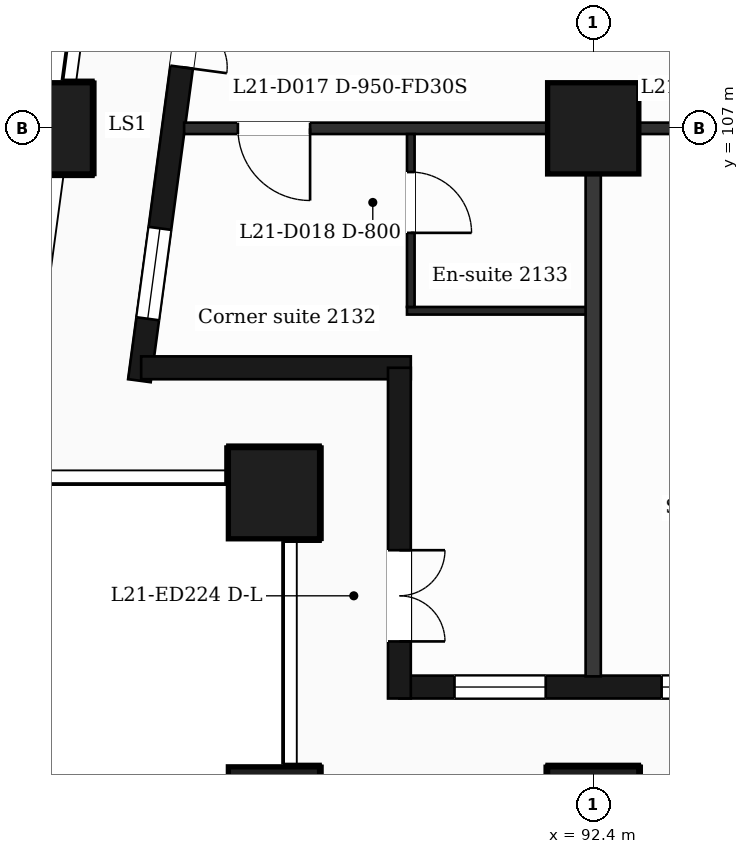
"""IFC4 building model, lengths in metres.
Left out: names, types, materials, properties, quantities, classifications, styles, units other than length and angle.
Written with IfcOpenShell. Run it as: python <this file> out.ifc"""

import sys

from ifc_helpers import new_model, si_unit, direction, frame, frame_2d, origin, origin_2d, place, context, subcontext, project, spatial, rectangle, extrude, element, fill, save


model = new_model("IFC4")
c1 = context("Model", 3, precision=1e-05, world=origin(), true_north=direction((0.0, 1.0)))
c2 = subcontext(c1, "Body", "Model", "MODEL_VIEW")
j1 = project(units=[si_unit("LENGTHUNIT", "METRE"), si_unit("PLANEANGLEUNIT", "RADIAN")], contexts=[c1])
p1 = place(None, origin())
s1 = spatial("IfcSite", under=j1, at=p1, CompositionType="ELEMENT")
p2 = place(p1, origin())
s2 = spatial("IfcBuilding", under=s1, at=p2, CompositionType="ELEMENT")
p3 = place(p2, frame((0.0, 0.0, 94.7)))
s3 = spatial("IfcBuildingStorey", under=s2, at=p3, CompositionType="ELEMENT", Elevation=94.7)
for number, where, z_axis, x_axis in (
    (1, (92.4, 98.0, 0.0), (0.0, 0.0, 1.0), (1.0, 0.0, 0.0)),
    (2, (88.2, 98.0, 0.0), (0.0, 0.0, 1.0), (1.0, 0.0, 0.0)),
    (3, (88.2, 102.2, 0.0), (0.0, 0.0, 1.0), (1.0, 0.0, 0.0)),
    (4, (92.4, 107.0, 0.0), (0.0, 0.0, 1.0), (1.0, 0.0, 0.0)),
    (5, (85.211, 107.0, 0.0), (0.0, 0.0, 1.0), (1.0, 0.0, 0.0)),
):
    element("IfcColumn", number, at=place(p3, frame(where, z_axis=z_axis, x_axis=x_axis)), inside=s3, PredefinedType="COLUMN", context=c2, shape_type="SweptSolid", body=[
        extrude(rectangle(XDim=1.2, YDim=1.2, at=origin_2d()), origin(), (0.0, 0.0, 1.0), 3.7),
    ])
p4 = place(p3, frame((89.85, 99.65, 0.0), z_axis=(0.0, 0.0, 1.0), x_axis=(1.0, 0.0, 0.0)))
e6 = element("IfcWall", 6, at=p4, inside=s3, PredefinedType="SOLIDWALL", context=c2, shape_type="SweptSolid", body=[
    extrude(rectangle(XDim=47.25, YDim=0.3, at=frame_2d((23.625, 0.0))), origin(), (0.0, 0.0, 1.0), 3.38),
])
p5 = place(p4, frame((0.725, 0.0, 0.9)))
e7 = element("IfcOpeningElement", 7, at=p5, cuts=e6, PredefinedType="OPENING", context=c2, shape_type="SweptSolid", body=[
    extrude(rectangle(XDim=1.2, YDim=2.1, at=frame_2d((0.6, 1.05))), frame((0.0, 0.16, 0.0), z_axis=(0.0, -1.0, 0.0), x_axis=(1.0, 0.0, 0.0)), (0.0, 0.0, 1.0), 0.32),
])
p6 = place(p4, frame((3.45, 0.0, 0.9)))
e8 = element("IfcOpeningElement", 8, at=p6, cuts=e6, PredefinedType="OPENING", context=c2, shape_type="SweptSolid", body=[
    extrude(rectangle(XDim=2.4, YDim=2.1, at=frame_2d((1.2, 1.05))), frame((0.0, 0.16, 0.0), z_axis=(0.0, -1.0, 0.0), x_axis=(1.0, 0.0, 0.0)), (0.0, 0.0, 1.0), 0.32),
])
p7 = place(p4, frame((7.65, 0.0, 0.9)))
e9 = element("IfcOpeningElement", 9, at=p7, cuts=e6, PredefinedType="OPENING", context=c2, shape_type="SweptSolid", body=[
    extrude(rectangle(XDim=2.4, YDim=2.1, at=frame_2d((1.2, 1.05))), frame((0.0, 0.16, 0.0), z_axis=(0.0, -1.0, 0.0), x_axis=(1.0, 0.0, 0.0)), (0.0, 0.0, 1.0), 0.32),
])
p8 = place(p4, frame((11.85, 0.0, 0.9)))
e10 = element("IfcOpeningElement", 10, at=p8, cuts=e6, PredefinedType="OPENING", context=c2, shape_type="SweptSolid", body=[
    extrude(rectangle(XDim=2.4, YDim=2.1, at=frame_2d((1.2, 1.05))), frame((0.0, 0.16, 0.0), z_axis=(0.0, -1.0, 0.0), x_axis=(1.0, 0.0, 0.0)), (0.0, 0.0, 1.0), 0.32),
])
p9 = place(p4, frame((16.05, 0.0, 0.9)))
e11 = element("IfcOpeningElement", 11, at=p9, cuts=e6, PredefinedType="OPENING", context=c2, shape_type="SweptSolid", body=[
    extrude(rectangle(XDim=2.4, YDim=2.1, at=frame_2d((1.2, 1.05))), frame((0.0, 0.16, 0.0), z_axis=(0.0, -1.0, 0.0), x_axis=(1.0, 0.0, 0.0)), (0.0, 0.0, 1.0), 0.32),
])
p10 = place(p4, frame((20.25, 0.0, 0.9)))
e12 = element("IfcOpeningElement", 12, at=p10, cuts=e6, PredefinedType="OPENING", context=c2, shape_type="SweptSolid", body=[
    extrude(rectangle(XDim=2.4, YDim=2.1, at=frame_2d((1.2, 1.05))), frame((0.0, 0.16, 0.0), z_axis=(0.0, -1.0, 0.0), x_axis=(1.0, 0.0, 0.0)), (0.0, 0.0, 1.0), 0.32),
])
p11 = place(p4, frame((25.05, 0.0, 0.9)))
e13 = element("IfcOpeningElement", 13, at=p11, cuts=e6, PredefinedType="OPENING", context=c2, shape_type="SweptSolid", body=[
    extrude(rectangle(XDim=1.2, YDim=2.1, at=frame_2d((0.6, 1.05))), frame((0.0, 0.16, 0.0), z_axis=(0.0, -1.0, 0.0), x_axis=(1.0, 0.0, 0.0)), (0.0, 0.0, 1.0), 0.32),
])
p12 = place(p4, frame((29.25, 0.0, 0.9)))
e14 = element("IfcOpeningElement", 14, at=p12, cuts=e6, PredefinedType="OPENING", context=c2, shape_type="SweptSolid", body=[
    extrude(rectangle(XDim=1.2, YDim=2.1, at=frame_2d((0.6, 1.05))), frame((0.0, 0.16, 0.0), z_axis=(0.0, -1.0, 0.0), x_axis=(1.0, 0.0, 0.0)), (0.0, 0.0, 1.0), 0.32),
])
p13 = place(p4, frame((32.55, 0.0, 0.0)))
e15 = element("IfcOpeningElement", 15, at=p13, cuts=e6, PredefinedType="OPENING", context=c2, shape_type="SweptSolid", body=[
    extrude(rectangle(XDim=1.2, YDim=2.4, at=frame_2d((0.6, 1.2))), frame((0.0, 0.16, 0.0), z_axis=(0.0, -1.0, 0.0), x_axis=(1.0, 0.0, 0.0)), (0.0, 0.0, 1.0), 0.32),
])
p14 = place(p4, frame((34.35, 0.0, 0.9)))
e16 = element("IfcOpeningElement", 16, at=p14, cuts=e6, PredefinedType="OPENING", context=c2, shape_type="SweptSolid", body=[
    extrude(rectangle(XDim=1.2, YDim=2.1, at=frame_2d((0.6, 1.05))), frame((0.0, 0.16, 0.0), z_axis=(0.0, -1.0, 0.0), x_axis=(1.0, 0.0, 0.0)), (0.0, 0.0, 1.0), 0.32),
])
p15 = place(p4, frame((37.05, 0.0, 0.9)))
e17 = element("IfcOpeningElement", 17, at=p15, cuts=e6, PredefinedType="OPENING", context=c2, shape_type="SweptSolid", body=[
    extrude(rectangle(XDim=2.4, YDim=2.1, at=frame_2d((1.2, 1.05))), frame((0.0, 0.16, 0.0), z_axis=(0.0, -1.0, 0.0), x_axis=(1.0, 0.0, 0.0)), (0.0, 0.0, 1.0), 0.32),
])
p16 = place(p4, frame((40.95, 0.0, 0.0)))
e18 = element("IfcOpeningElement", 18, at=p16, cuts=e6, PredefinedType="OPENING", context=c2, shape_type="SweptSolid", body=[
    extrude(rectangle(XDim=1.2, YDim=2.4, at=frame_2d((0.6, 1.2))), frame((0.0, 0.16, 0.0), z_axis=(0.0, -1.0, 0.0), x_axis=(1.0, 0.0, 0.0)), (0.0, 0.0, 1.0), 0.32),
])
p17 = place(p4, frame((42.75, 0.0, 0.9)))
e19 = element("IfcOpeningElement", 19, at=p17, cuts=e6, PredefinedType="OPENING", context=c2, shape_type="SweptSolid", body=[
    extrude(rectangle(XDim=1.2, YDim=2.1, at=frame_2d((0.6, 1.05))), frame((0.0, 0.16, 0.0), z_axis=(0.0, -1.0, 0.0), x_axis=(1.0, 0.0, 0.0)), (0.0, 0.0, 1.0), 0.32),
])
p18 = place(p4, frame((45.25, 0.0, 0.9)))
e20 = element("IfcOpeningElement", 20, at=p18, cuts=e6, PredefinedType="OPENING", context=c2, shape_type="SweptSolid", body=[
    extrude(rectangle(XDim=1.2, YDim=2.1, at=frame_2d((0.6, 1.05))), frame((0.0, 0.16, 0.0), z_axis=(0.0, -1.0, 0.0), x_axis=(1.0, 0.0, 0.0)), (0.0, 0.0, 1.0), 0.32),
])
p19 = place(p3, frame((87.334, 110.4, 0.0), z_axis=(0.0, 0.0, 1.0), x_axis=(-0.133437175554, -0.991057273915, 0.0)))
e21 = element("IfcWall", 21, at=p19, inside=s3, PredefinedType="SOLIDWALL", context=c2, shape_type="SweptSolid", body=[
    extrude(rectangle(XDim=6.781, YDim=0.3, at=frame_2d((3.39, 0.0))), origin(), (0.0, 0.0, 1.0), 3.38),
])
p20 = place(p19, frame((1.418, 0.0, 0.0)))
e22 = element("IfcOpeningElement", 22, at=p20, cuts=e21, PredefinedType="OPENING", context=c2, shape_type="SweptSolid", body=[
    extrude(rectangle(XDim=1.2, YDim=2.4, at=frame_2d((0.6, 1.2))), frame((0.0, 0.16, 0.0), z_axis=(0.0, -1.0, 0.0), x_axis=(1.0, 0.0, 0.0)), (0.0, 0.0, 1.0), 0.32),
])
p21 = place(p19, frame((4.758, 0.0, 0.9)))
e23 = element("IfcOpeningElement", 23, at=p21, cuts=e21, PredefinedType="OPENING", context=c2, shape_type="SweptSolid", body=[
    extrude(rectangle(XDim=1.2, YDim=2.1, at=frame_2d((0.6, 1.05))), frame((0.0, 0.16, 0.0), z_axis=(0.0, -1.0, 0.0), x_axis=(1.0, 0.0, 0.0)), (0.0, 0.0, 1.0), 0.32),
])
p22 = place(p3, frame((86.452, 103.85, 0.0), z_axis=(0.0, 0.0, 1.0), x_axis=(1.0, 0.0, 0.0)))
e24 = element("IfcWall", 24, at=p22, inside=s3, PredefinedType="SOLIDWALL", context=c2, shape_type="SweptSolid", body=[
    extrude(rectangle(XDim=3.548, YDim=0.3, at=frame_2d((1.774, 0.0))), origin(), (0.0, 0.0, 1.0), 3.38),
])
p23 = place(p3, frame((89.85, 103.85, 0.0), z_axis=(0.0, 0.0, 1.0), x_axis=(0.0, -1.0, 0.0)))
e25 = element("IfcWall", 25, at=p23, inside=s3, PredefinedType="SOLIDWALL", context=c2, shape_type="SweptSolid", body=[
    extrude(rectangle(XDim=4.35, YDim=0.3, at=frame_2d((2.175, 0.0))), origin(), (0.0, 0.0, 1.0), 3.38),
])
p24 = place(p23, frame((2.4, 0.0, 0.0)))
e26 = element("IfcOpeningElement", 26, at=p24, cuts=e25, PredefinedType="OPENING", context=c2, shape_type="SweptSolid", body=[
    extrude(rectangle(XDim=1.2, YDim=2.4, at=frame_2d((0.6, 1.2))), frame((0.0, 0.16, 0.0), z_axis=(0.0, -1.0, 0.0), x_axis=(1.0, 0.0, 0.0)), (0.0, 0.0, 1.0), 0.32),
])
p25 = place(p3, frame((89.95, 104.6, 0.0), z_axis=(0.0, 0.0, 1.0), x_axis=(1.0, 0.0, 0.0)))
e27 = element("IfcWall", 27, at=p25, inside=s3, PredefinedType="PARTITIONING", context=c2, shape_type="SweptSolid", body=[
    extrude(rectangle(XDim=2.45, YDim=0.1, at=frame_2d((1.225, 0.0))), origin(), (0.0, 0.0, 1.0), 3.38),
])
p26 = place(p3, frame((87.018, 107.0, 0.0), z_axis=(0.0, 0.0, 1.0), x_axis=(1.0, 0.0, 0.0)))
e28 = element("IfcWall", 28, at=p26, inside=s3, PredefinedType="PARTITIONING", context=c2, shape_type="SweptSolid", body=[
    extrude(rectangle(XDim=52.765, YDim=0.15, at=frame_2d((26.382, 0.0))), origin(), (0.0, 0.0, 1.0), 3.38),
])
p27 = place(p26, frame((0.707, 0.0, 0.0)))
e29 = element("IfcOpeningElement", 29, at=p27, cuts=e28, PredefinedType="OPENING", context=c2, shape_type="SweptSolid", body=[
    extrude(rectangle(XDim=0.95, YDim=2.1, at=frame_2d((0.475, 1.05))), frame((0.0, 0.085, 0.0), z_axis=(0.0, -1.0, 0.0), x_axis=(1.0, 0.0, 0.0)), (0.0, 0.0, 1.0), 0.17),
])
p28 = place(p26, frame((6.982, 0.0, 0.0)))
e30 = element("IfcOpeningElement", 30, at=p28, cuts=e28, PredefinedType="OPENING", context=c2, shape_type="SweptSolid", body=[
    extrude(rectangle(XDim=1.0, YDim=2.1, at=frame_2d((0.5, 1.05))), frame((0.0, 0.085, 0.0), z_axis=(0.0, -1.0, 0.0), x_axis=(1.0, 0.0, 0.0)), (0.0, 0.0, 1.0), 0.17),
])
p29 = place(p26, frame((16.457, 0.0, 0.0)))
e31 = element("IfcOpeningElement", 31, at=p29, cuts=e28, PredefinedType="OPENING", context=c2, shape_type="SweptSolid", body=[
    extrude(rectangle(XDim=0.95, YDim=2.1, at=frame_2d((0.475, 1.05))), frame((0.0, 0.085, 0.0), z_axis=(0.0, -1.0, 0.0), x_axis=(1.0, 0.0, 0.0)), (0.0, 0.0, 1.0), 0.17),
])
p30 = place(p26, frame((18.445, 0.0, 0.0)))
e32 = element("IfcOpeningElement", 32, at=p30, cuts=e28, PredefinedType="OPENING", context=c2, shape_type="SweptSolid", body=[
    extrude(rectangle(XDim=0.95, YDim=2.1, at=frame_2d((0.475, 1.05))), frame((0.0, 0.085, 0.0), z_axis=(0.0, -1.0, 0.0), x_axis=(1.0, 0.0, 0.0)), (0.0, 0.0, 1.0), 0.17),
])
p31 = place(p26, frame((25.157, 0.0, 0.0)))
e33 = element("IfcOpeningElement", 33, at=p31, cuts=e28, PredefinedType="OPENING", context=c2, shape_type="SweptSolid", body=[
    extrude(rectangle(XDim=0.95, YDim=2.1, at=frame_2d((0.475, 1.05))), frame((0.0, 0.085, 0.0), z_axis=(0.0, -1.0, 0.0), x_axis=(1.0, 0.0, 0.0)), (0.0, 0.0, 1.0), 0.17),
])
p32 = place(p26, frame((27.07, 0.0, 0.0)))
e34 = element("IfcOpeningElement", 34, at=p32, cuts=e28, PredefinedType="OPENING", context=c2, shape_type="SweptSolid", body=[
    extrude(rectangle(XDim=0.95, YDim=2.1, at=frame_2d((0.475, 1.05))), frame((0.0, 0.085, 0.0), z_axis=(0.0, -1.0, 0.0), x_axis=(1.0, 0.0, 0.0)), (0.0, 0.0, 1.0), 0.17),
])
p33 = place(p26, frame((34.712, 0.0, 0.0)))
e35 = element("IfcOpeningElement", 35, at=p33, cuts=e28, PredefinedType="OPENING", context=c2, shape_type="SweptSolid", body=[
    extrude(rectangle(XDim=0.95, YDim=2.1, at=frame_2d((0.475, 1.05))), frame((0.0, 0.085, 0.0), z_axis=(0.0, -1.0, 0.0), x_axis=(1.0, 0.0, 0.0)), (0.0, 0.0, 1.0), 0.17),
])
p34 = place(p26, frame((39.807, 0.0, 0.0)))
e36 = element("IfcOpeningElement", 36, at=p34, cuts=e28, PredefinedType="OPENING", context=c2, shape_type="SweptSolid", body=[
    extrude(rectangle(XDim=0.95, YDim=2.1, at=frame_2d((0.475, 1.05))), frame((0.0, 0.085, 0.0), z_axis=(0.0, -1.0, 0.0), x_axis=(1.0, 0.0, 0.0)), (0.0, 0.0, 1.0), 0.17),
])
p35 = place(p26, frame((45.622, 0.0, 0.0)))
e37 = element("IfcOpeningElement", 37, at=p35, cuts=e28, PredefinedType="OPENING", context=c2, shape_type="SweptSolid", body=[
    extrude(rectangle(XDim=0.95, YDim=2.1, at=frame_2d((0.475, 1.05))), frame((0.0, 0.085, 0.0), z_axis=(0.0, -1.0, 0.0), x_axis=(1.0, 0.0, 0.0)), (0.0, 0.0, 1.0), 0.17),
])
p36 = place(p26, frame((48.974, 0.0, 0.0)))
e38 = element("IfcOpeningElement", 38, at=p36, cuts=e28, PredefinedType="OPENING", context=c2, shape_type="SweptSolid", body=[
    extrude(rectangle(XDim=0.95, YDim=2.1, at=frame_2d((0.475, 1.05))), frame((0.0, 0.085, 0.0), z_axis=(0.0, -1.0, 0.0), x_axis=(1.0, 0.0, 0.0)), (0.0, 0.0, 1.0), 0.17),
])
p37 = place(p3, frame((90.0, 104.65, 0.0), z_axis=(0.0, 0.0, 1.0), x_axis=(0.0, 1.0, 0.0)))
e39 = element("IfcWall", 39, at=p37, inside=s3, PredefinedType="PARTITIONING", context=c2, shape_type="SweptSolid", body=[
    extrude(rectangle(XDim=2.275, YDim=0.1, at=frame_2d((1.138, 0.0))), origin(), (0.0, 0.0, 1.0), 3.38),
])
p38 = place(p37, frame((0.975, 0.0, 0.0)))
e40 = element("IfcOpeningElement", 40, at=p38, cuts=e39, PredefinedType="OPENING", context=c2, shape_type="SweptSolid", body=[
    extrude(rectangle(XDim=0.8, YDim=2.1, at=frame_2d((0.4, 1.05))), frame((0.0, 0.06, 0.0), z_axis=(0.0, -1.0, 0.0), x_axis=(1.0, 0.0, 0.0)), (0.0, 0.0, 1.0), 0.12),
])
p39 = place(p3, frame((92.4, 99.79, 0.0), z_axis=(0.0, 0.0, 1.0), x_axis=(0.0, 1.0, 0.0)))
e41 = element("IfcWall", 41, at=p39, inside=s3, PredefinedType="PARTITIONING", context=c2, shape_type="SweptSolid", body=[
    extrude(rectangle(XDim=7.135, YDim=0.2, at=frame_2d((3.567, 0.0))), origin(), (0.0, 0.0, 1.0), 3.38),
])
p40 = place(p5, origin())
e42 = element("IfcWindow", 42, at=p40, inside=s3, PartitioningType="SINGLE_PANEL", PredefinedType="WINDOW", context=c2, shape_type="SweptSolid", body=[
    extrude(rectangle(XDim=1.2, YDim=2.1, at=frame_2d((0.6, 1.05))), frame((0.0, 0.03, 0.0), z_axis=(0.0, -1.0, 0.0), x_axis=(1.0, 0.0, 0.0)), (0.0, 0.0, 1.0), 0.06),
])
fill(e7, e42)
p41 = place(p6, origin())
e43 = element("IfcWindow", 43, at=p41, inside=s3, PartitioningType="SINGLE_PANEL", PredefinedType="WINDOW", context=c2, shape_type="SweptSolid", body=[
    extrude(rectangle(XDim=2.4, YDim=2.1, at=frame_2d((1.2, 1.05))), frame((0.0, 0.03, 0.0), z_axis=(0.0, -1.0, 0.0), x_axis=(1.0, 0.0, 0.0)), (0.0, 0.0, 1.0), 0.06),
])
fill(e8, e43)
p42 = place(p20, origin())
e44 = element("IfcDoor", 44, at=p42, inside=s3, OperationType="DOUBLE_DOOR_SINGLE_SWING", PredefinedType="DOOR", context=c2, shape_type="SweptSolid", body=[
    extrude(rectangle(XDim=1.2, YDim=2.4, at=frame_2d((0.6, 1.2))), frame((0.0, 0.025, 0.0), z_axis=(0.0, -1.0, 0.0), x_axis=(1.0, 0.0, 0.0)), (0.0, 0.0, 1.0), 0.05),
])
fill(e22, e44)
p43 = place(p21, origin())
e45 = element("IfcWindow", 45, at=p43, inside=s3, PartitioningType="SINGLE_PANEL", PredefinedType="WINDOW", context=c2, shape_type="SweptSolid", body=[
    extrude(rectangle(XDim=1.2, YDim=2.1, at=frame_2d((0.6, 1.05))), frame((0.0, 0.03, 0.0), z_axis=(0.0, -1.0, 0.0), x_axis=(1.0, 0.0, 0.0)), (0.0, 0.0, 1.0), 0.06),
])
fill(e23, e45)
p44 = place(p24, origin())
e46 = element("IfcDoor", 46, at=p44, inside=s3, OperationType="DOUBLE_DOOR_SINGLE_SWING", PredefinedType="DOOR", context=c2, shape_type="SweptSolid", body=[
    extrude(rectangle(XDim=1.2, YDim=2.4, at=frame_2d((0.6, 1.2))), frame((0.0, 0.025, 0.0), z_axis=(0.0, -1.0, 0.0), x_axis=(1.0, 0.0, 0.0)), (0.0, 0.0, 1.0), 0.05),
])
fill(e26, e46)
p45 = place(p27, origin())
e47 = element("IfcDoor", 47, at=p45, inside=s3, OperationType="SINGLE_SWING_RIGHT", PredefinedType="DOOR", context=c2, shape_type="SweptSolid", body=[
    extrude(rectangle(XDim=0.95, YDim=2.1, at=frame_2d((0.475, 1.05))), frame((0.0, 0.025, 0.0), z_axis=(0.0, -1.0, 0.0), x_axis=(1.0, 0.0, 0.0)), (0.0, 0.0, 1.0), 0.05),
])
fill(e29, e47)
p46 = place(p38, origin())
e48 = element("IfcDoor", 48, at=p46, inside=s3, OperationType="SINGLE_SWING_LEFT", PredefinedType="DOOR", context=c2, shape_type="SweptSolid", body=[
    extrude(rectangle(XDim=0.8, YDim=2.1, at=frame_2d((0.4, 1.05))), frame((0.0, 0.025, 0.0), z_axis=(0.0, -1.0, 0.0), x_axis=(1.0, 0.0, 0.0)), (0.0, 0.0, 1.0), 0.05),
])
fill(e40, e48)
save(model, sys.argv[1])
